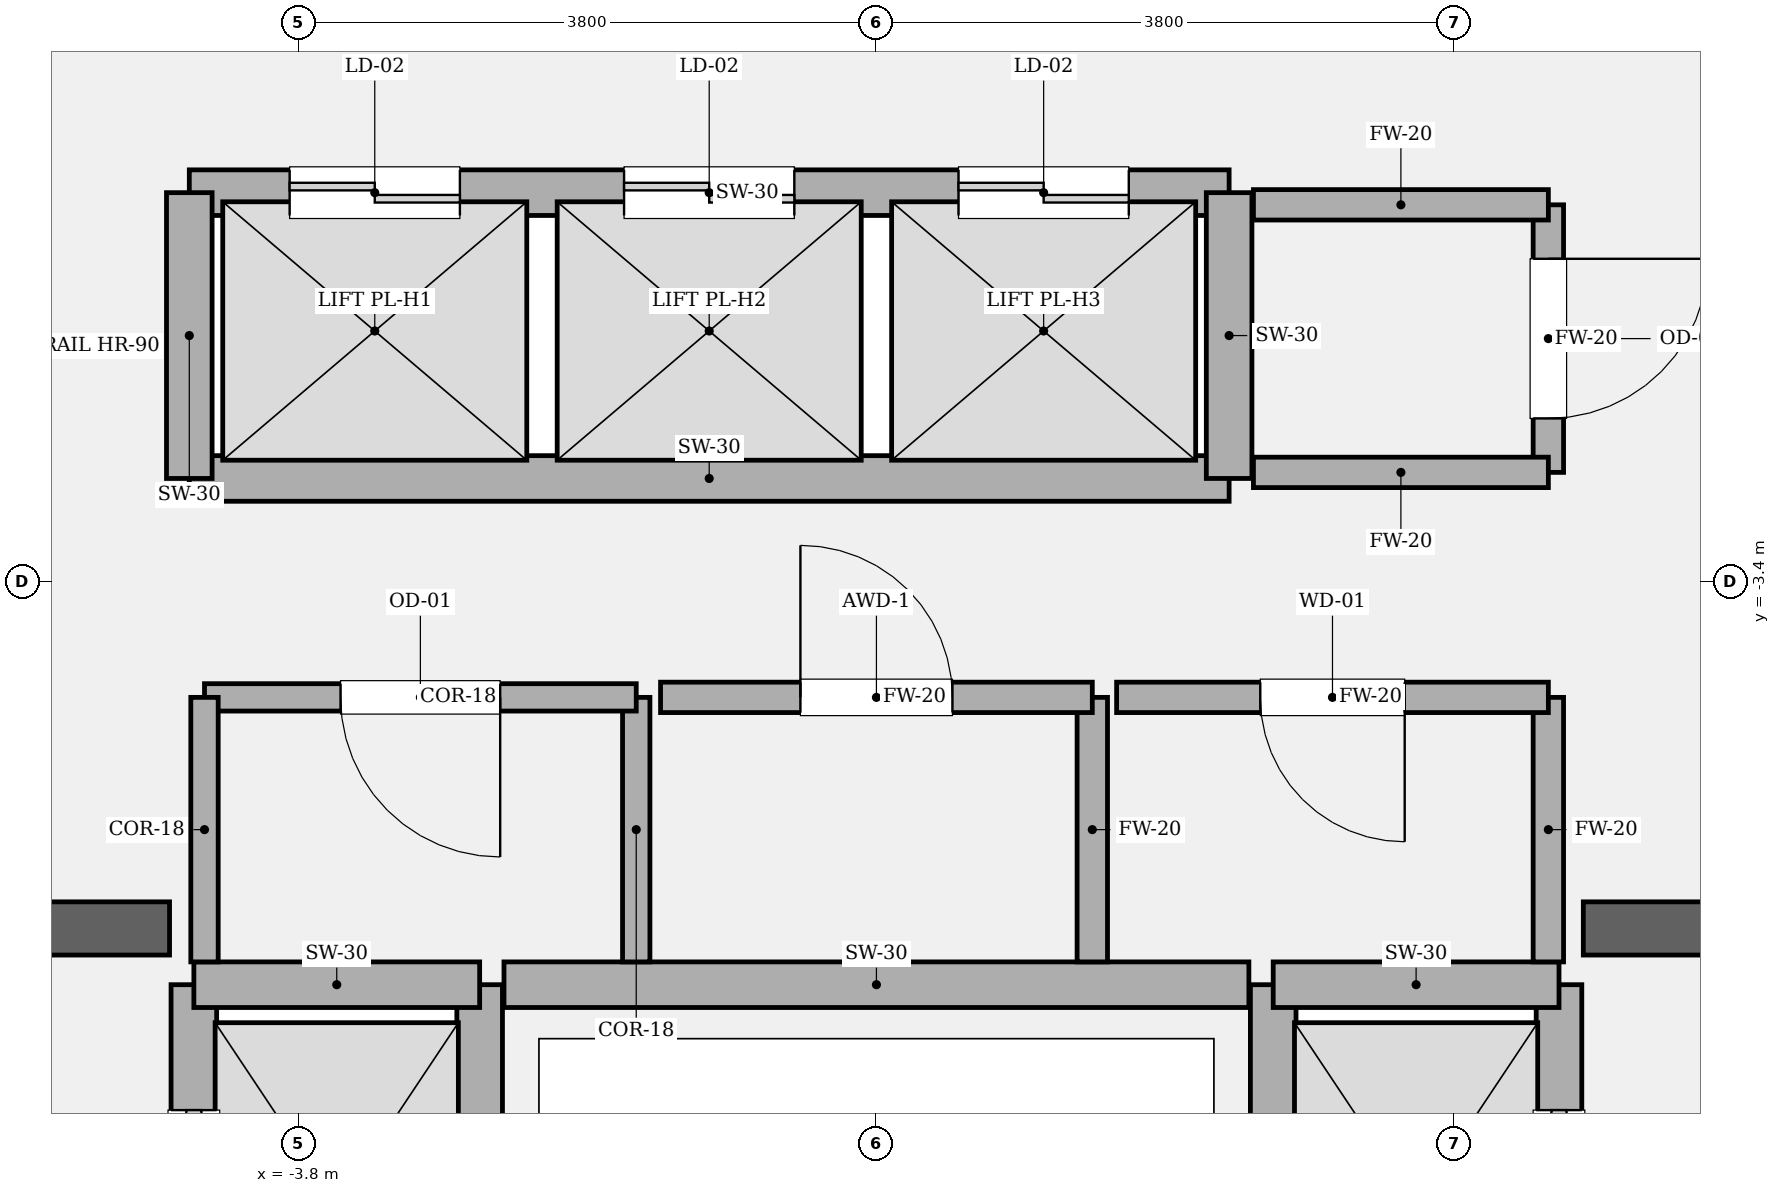
"""IFC4 building model, lengths in metres.
Left out: names, types, materials, properties, quantities, classifications, styles, units other than length and angle.
Written with IfcOpenShell. Run it as: python <this file> out.ifc"""

import sys

from ifc_helpers import new_model, si_unit, direction, frame, frame_2d, origin, place, context, subcontext, project, spatial, rectangle, extrude, element, fill, save


model = new_model("IFC4")
c1 = context("Model", 3, precision=1e-05, world=origin(), true_north=direction((0.0, 1.0)))
c2 = subcontext(c1, "Body", "Model", "MODEL_VIEW")
j1 = project(units=[si_unit("LENGTHUNIT", "METRE"), si_unit("PLANEANGLEUNIT", "RADIAN")], contexts=[c1])
p1 = place(None, origin())
s1 = spatial("IfcSite", under=j1, at=p1, CompositionType="ELEMENT")
p2 = place(p1, origin())
s2 = spatial("IfcBuilding", under=s1, at=p2, CompositionType="ELEMENT")
p3 = place(p2, frame((0.0, 0.0, 267.6)))
s3 = spatial("IfcBuildingStorey", under=s2, at=p3, CompositionType="ELEMENT", Elevation=267.6)
p4 = place(p3, frame((-9.925, -5.68, 0.0), z_axis=(0.0, 0.0, 1.0), x_axis=(1.0, 0.0, 0.0)))
e1 = element("IfcWall", 1, at=p4, inside=s3, PredefinedType="SOLIDWALL", context=c2, shape_type="SweptSolid", body=[
    extrude(rectangle(XDim=5.275, YDim=0.35, at=frame_2d((2.638, 0.0))), origin(), (0.0, 0.0, 1.0), 4.05),
])
p5 = place(p4, frame((1.385, 0.0, 0.0)))
e2 = element("IfcOpeningElement", 2, at=p5, cuts=e1, PredefinedType="OPENING", context=c2, shape_type="SweptSolid", body=[
    extrude(rectangle(XDim=1.18, YDim=2.2, at=frame_2d((0.59, 1.1))), frame((0.0, 0.185, 0.0), z_axis=(0.0, -1.0, 0.0), x_axis=(1.0, 0.0, 0.0)), (0.0, 0.0, 1.0), 0.37),
])
p6 = place(p3, frame((4.65, -5.68, 0.0), z_axis=(0.0, 0.0, 1.0), x_axis=(1.0, 0.0, 0.0)))
e3 = element("IfcWall", 3, at=p6, inside=s3, PredefinedType="SOLIDWALL", context=c2, shape_type="SweptSolid", body=[
    extrude(rectangle(XDim=5.275, YDim=0.35, at=frame_2d((2.638, 0.0))), origin(), (0.0, 0.0, 1.0), 4.05),
])
p7 = place(p6, frame((2.71, 0.0, 0.0)))
e4 = element("IfcOpeningElement", 4, at=p7, cuts=e3, PredefinedType="OPENING", context=c2, shape_type="SweptSolid", body=[
    extrude(rectangle(XDim=1.18, YDim=2.2, at=frame_2d((0.59, 1.1))), frame((0.0, 0.185, 0.0), z_axis=(0.0, -1.0, 0.0), x_axis=(1.0, 0.0, 0.0)), (0.0, 0.0, 1.0), 0.37),
])
p8 = place(p3, frame((-4.49, -8.82, 0.0), z_axis=(0.0, 0.0, 1.0), x_axis=(0.0, 1.0, 0.0)))
e5 = element("IfcWall", 5, at=p8, inside=s3, PredefinedType="SOLIDWALL", context=c2, shape_type="SweptSolid", body=[
    extrude(rectangle(XDim=2.77, YDim=0.3, at=frame_2d((1.385, 0.0))), origin(), (0.0, 0.0, 1.0), 3.85),
])
p9 = place(p8, frame((0.825, 0.0, 0.0)))
e6 = element("IfcOpeningElement", 6, at=p9, cuts=e5, PredefinedType="OPENING", context=c2, shape_type="SweptSolid", body=[
    extrude(rectangle(XDim=1.12, YDim=2.25, at=frame_2d((0.56, 1.125))), frame((0.0, 0.16, 0.0), z_axis=(0.0, -1.0, 0.0), x_axis=(1.0, 0.0, 0.0)), (0.0, 0.0, 1.0), 0.32),
])
p10 = place(p3, frame((-2.61, -8.82, 0.0), z_axis=(0.0, 0.0, 1.0), x_axis=(0.0, 1.0, 0.0)))
e7 = element("IfcWall", 7, at=p10, inside=s3, PredefinedType="SOLIDWALL", context=c2, shape_type="SweptSolid", body=[
    extrude(rectangle(XDim=2.77, YDim=0.3, at=frame_2d((1.385, 0.0))), origin(), (0.0, 0.0, 1.0), 3.85),
])
p11 = place(p3, frame((-4.49, -6.05, 0.0), z_axis=(0.0, 0.0, 1.0), x_axis=(1.0, 0.0, 0.0)))
e8 = element("IfcWall", 8, at=p11, inside=s3, PredefinedType="SOLIDWALL", context=c2, shape_type="SweptSolid", body=[
    extrude(rectangle(XDim=1.88, YDim=0.3, at=frame_2d((0.94, 0.0))), origin(), (0.0, 0.0, 1.0), 3.85),
])
p12 = place(p3, frame((4.49, -8.82, 0.0), z_axis=(0.0, 0.0, 1.0), x_axis=(0.0, 1.0, 0.0)))
e9 = element("IfcWall", 9, at=p12, inside=s3, PredefinedType="SOLIDWALL", context=c2, shape_type="SweptSolid", body=[
    extrude(rectangle(XDim=2.77, YDim=0.3, at=frame_2d((1.385, 0.0))), origin(), (0.0, 0.0, 1.0), 3.85),
])
p13 = place(p12, frame((0.825, 0.0, 0.0)))
e10 = element("IfcOpeningElement", 10, at=p13, cuts=e9, PredefinedType="OPENING", context=c2, shape_type="SweptSolid", body=[
    extrude(rectangle(XDim=1.12, YDim=2.25, at=frame_2d((0.56, 1.125))), frame((0.0, 0.16, 0.0), z_axis=(0.0, -1.0, 0.0), x_axis=(1.0, 0.0, 0.0)), (0.0, 0.0, 1.0), 0.32),
])
p14 = place(p3, frame((2.61, -8.82, 0.0), z_axis=(0.0, 0.0, 1.0), x_axis=(0.0, 1.0, 0.0)))
e11 = element("IfcWall", 11, at=p14, inside=s3, PredefinedType="SOLIDWALL", context=c2, shape_type="SweptSolid", body=[
    extrude(rectangle(XDim=2.77, YDim=0.3, at=frame_2d((1.385, 0.0))), origin(), (0.0, 0.0, 1.0), 3.85),
])
p15 = place(p3, frame((2.61, -6.05, 0.0), z_axis=(0.0, 0.0, 1.0), x_axis=(1.0, 0.0, 0.0)))
e12 = element("IfcWall", 12, at=p15, inside=s3, PredefinedType="SOLIDWALL", context=c2, shape_type="SweptSolid", body=[
    extrude(rectangle(XDim=1.88, YDim=0.3, at=frame_2d((0.94, 0.0))), origin(), (0.0, 0.0, 1.0), 3.85),
])
p16 = place(p3, frame((-4.52, -0.84, 0.0), z_axis=(0.0, 0.0, 1.0), x_axis=(1.0, 0.0, 0.0)))
e13 = element("IfcWall", 13, at=p16, inside=s3, PredefinedType="SOLIDWALL", context=c2, shape_type="SweptSolid", body=[
    extrude(rectangle(XDim=6.84, YDim=0.3, at=frame_2d((3.42, 0.0))), origin(), (0.0, 0.0, 1.0), 3.85),
])
p17 = place(p16, frame((0.66, 0.0, 0.0)))
e14 = element("IfcOpeningElement", 14, at=p17, cuts=e13, PredefinedType="OPENING", context=c2, shape_type="SweptSolid", body=[
    extrude(rectangle(XDim=1.12, YDim=2.25, at=frame_2d((0.56, 1.125))), frame((0.0, 0.16, 0.0), z_axis=(0.0, -1.0, 0.0), x_axis=(1.0, 0.0, 0.0)), (0.0, 0.0, 1.0), 0.32),
])
p18 = place(p16, frame((2.86, 0.0, 0.0)))
e15 = element("IfcOpeningElement", 15, at=p18, cuts=e13, PredefinedType="OPENING", context=c2, shape_type="SweptSolid", body=[
    extrude(rectangle(XDim=1.12, YDim=2.25, at=frame_2d((0.56, 1.125))), frame((0.0, 0.16, 0.0), z_axis=(0.0, -1.0, 0.0), x_axis=(1.0, 0.0, 0.0)), (0.0, 0.0, 1.0), 0.32),
])
p19 = place(p16, frame((5.06, 0.0, 0.0)))
e16 = element("IfcOpeningElement", 16, at=p19, cuts=e13, PredefinedType="OPENING", context=c2, shape_type="SweptSolid", body=[
    extrude(rectangle(XDim=1.12, YDim=2.25, at=frame_2d((0.56, 1.125))), frame((0.0, 0.16, 0.0), z_axis=(0.0, -1.0, 0.0), x_axis=(1.0, 0.0, 0.0)), (0.0, 0.0, 1.0), 0.32),
])
p20 = place(p3, frame((-4.52, -2.72, 0.0), z_axis=(0.0, 0.0, 1.0), x_axis=(1.0, 0.0, 0.0)))
e17 = element("IfcWall", 17, at=p20, inside=s3, PredefinedType="SOLIDWALL", context=c2, shape_type="SweptSolid", body=[
    extrude(rectangle(XDim=6.84, YDim=0.3, at=frame_2d((3.42, 0.0))), origin(), (0.0, 0.0, 1.0), 3.85),
])
for number, where, z_axis, x_axis in (
    (18, (-4.52, -2.72, 0.0), (0.0, 0.0, 1.0), (0.0, 1.0, 0.0)),
    (19, (2.32, -2.72, 0.0), (0.0, 0.0, 1.0), (0.0, 1.0, 0.0)),
):
    element("IfcWall", number, at=place(p3, frame(where, z_axis=z_axis, x_axis=x_axis)), inside=s3, PredefinedType="SOLIDWALL", context=c2, shape_type="SweptSolid", body=[
        extrude(rectangle(XDim=1.88, YDim=0.3, at=frame_2d((0.94, 0.0))), origin(), (0.0, 0.0, 1.0), 3.85),
    ])
p21 = place(p3, frame((-2.45, -6.05, 0.0), z_axis=(0.0, 0.0, 1.0), x_axis=(1.0, 0.0, 0.0)))
e20 = element("IfcWall", 20, at=p21, inside=s3, PredefinedType="SOLIDWALL", context=c2, shape_type="SweptSolid", body=[
    extrude(rectangle(XDim=4.9, YDim=0.3, at=frame_2d((2.45, 0.0))), origin(), (0.0, 0.0, 1.0), 3.85),
])
p22 = place(p3, frame((-1.58, -5.9, 0.0), z_axis=(0.0, 0.0, 1.0), x_axis=(0.0, 1.0, 0.0)))
e21 = element("IfcWall", 21, at=p22, inside=s3, PredefinedType="PARTITIONING", context=c2, shape_type="SweptSolid", body=[
    extrude(rectangle(XDim=1.74, YDim=0.18, at=frame_2d((0.87, 0.0))), origin(), (0.0, 0.0, 1.0), 3.85),
])
p23 = place(p3, frame((-1.58, -4.16, 0.0), z_axis=(0.0, 0.0, 1.0), x_axis=(-1.0, 0.0, 0.0)))
e22 = element("IfcWall", 22, at=p23, inside=s3, PredefinedType="PARTITIONING", context=c2, shape_type="SweptSolid", body=[
    extrude(rectangle(XDim=2.84, YDim=0.18, at=frame_2d((1.42, 0.0))), origin(), (0.0, 0.0, 1.0), 3.85),
])
p24 = place(p23, frame((0.895, 0.0, 0.0)))
e23 = element("IfcOpeningElement", 23, at=p24, cuts=e22, PredefinedType="OPENING", context=c2, shape_type="SweptSolid", body=[
    extrude(rectangle(XDim=1.05, YDim=2.2, at=frame_2d((0.525, 1.1))), frame((0.0, 0.1, 0.0), z_axis=(0.0, -1.0, 0.0), x_axis=(1.0, 0.0, 0.0)), (0.0, 0.0, 1.0), 0.2),
])
p25 = place(p3, frame((-4.42, -4.16, 0.0), z_axis=(0.0, 0.0, 1.0), x_axis=(0.0, -1.0, 0.0)))
e24 = element("IfcWall", 24, at=p25, inside=s3, PredefinedType="PARTITIONING", context=c2, shape_type="SweptSolid", body=[
    extrude(rectangle(XDim=1.74, YDim=0.18, at=frame_2d((0.87, 0.0))), origin(), (0.0, 0.0, 1.0), 3.85),
])
p26 = place(p3, frame((1.42, -5.9, 0.0), z_axis=(0.0, 0.0, 1.0), x_axis=(0.0, 1.0, 0.0)))
e25 = element("IfcWall", 25, at=p26, inside=s3, PredefinedType="SOLIDWALL", context=c2, shape_type="SweptSolid", body=[
    extrude(rectangle(XDim=1.74, YDim=0.2, at=frame_2d((0.87, 0.0))), origin(), (0.0, 0.0, 1.0), 3.85),
])
p27 = place(p3, frame((1.42, -4.16, 0.0), z_axis=(0.0, 0.0, 1.0), x_axis=(-1.0, 0.0, 0.0)))
e26 = element("IfcWall", 26, at=p27, inside=s3, PredefinedType="SOLIDWALL", context=c2, shape_type="SweptSolid", body=[
    extrude(rectangle(XDim=2.84, YDim=0.2, at=frame_2d((1.42, 0.0))), origin(), (0.0, 0.0, 1.0), 3.85),
])
p28 = place(p27, frame((0.92, 0.0, 0.0)))
e27 = element("IfcOpeningElement", 27, at=p28, cuts=e26, PredefinedType="OPENING", context=c2, shape_type="SweptSolid", body=[
    extrude(rectangle(XDim=1.0, YDim=2.15, at=frame_2d((0.5, 1.075))), frame((0.0, 0.11, 0.0), z_axis=(0.0, -1.0, 0.0), x_axis=(1.0, 0.0, 0.0)), (0.0, 0.0, 1.0), 0.22),
])
p29 = place(p3, frame((4.42, -5.9, 0.0), z_axis=(0.0, 0.0, 1.0), x_axis=(0.0, 1.0, 0.0)))
e28 = element("IfcWall", 28, at=p29, inside=s3, PredefinedType="SOLIDWALL", context=c2, shape_type="SweptSolid", body=[
    extrude(rectangle(XDim=1.74, YDim=0.2, at=frame_2d((0.87, 0.0))), origin(), (0.0, 0.0, 1.0), 3.85),
])
p30 = place(p3, frame((4.42, -4.16, 0.0), z_axis=(0.0, 0.0, 1.0), x_axis=(-1.0, 0.0, 0.0)))
e29 = element("IfcWall", 29, at=p30, inside=s3, PredefinedType="SOLIDWALL", context=c2, shape_type="SweptSolid", body=[
    extrude(rectangle(XDim=2.84, YDim=0.2, at=frame_2d((1.42, 0.0))), origin(), (0.0, 0.0, 1.0), 3.85),
])
p31 = place(p30, frame((0.945, 0.0, 0.0)))
e30 = element("IfcOpeningElement", 30, at=p31, cuts=e29, PredefinedType="OPENING", context=c2, shape_type="SweptSolid", body=[
    extrude(rectangle(XDim=0.95, YDim=2.15, at=frame_2d((0.475, 1.075))), frame((0.0, 0.11, 0.0), z_axis=(0.0, -1.0, 0.0), x_axis=(1.0, 0.0, 0.0)), (0.0, 0.0, 1.0), 0.22),
])
p32 = place(p3, frame((4.42, -2.68, 0.0), z_axis=(0.0, 0.0, 1.0), x_axis=(0.0, 1.0, 0.0)))
e31 = element("IfcWall", 31, at=p32, inside=s3, PredefinedType="SOLIDWALL", context=c2, shape_type="SweptSolid", body=[
    extrude(rectangle(XDim=1.76, YDim=0.2, at=frame_2d((0.88, 0.0))), origin(), (0.0, 0.0, 1.0), 3.85),
])
p33 = place(p32, frame((0.355, 0.0, 0.0)))
e32 = element("IfcOpeningElement", 32, at=p33, cuts=e31, PredefinedType="OPENING", context=c2, shape_type="SweptSolid", body=[
    extrude(rectangle(XDim=1.05, YDim=2.2, at=frame_2d((0.525, 1.1))), frame((0.0, 0.11, 0.0), z_axis=(0.0, -1.0, 0.0), x_axis=(1.0, 0.0, 0.0)), (0.0, 0.0, 1.0), 0.22),
])
for number, where, z_axis, x_axis in (
    (33, (4.42, -0.92, 0.0), (0.0, 0.0, 1.0), (-1.0, 0.0, 0.0)),
    (34, (2.48, -2.68, 0.0), (0.0, 0.0, 1.0), (1.0, 0.0, 0.0)),
):
    element("IfcWall", number, at=place(p3, frame(where, z_axis=z_axis, x_axis=x_axis)), inside=s3, PredefinedType="SOLIDWALL", context=c2, shape_type="SweptSolid", body=[
        extrude(rectangle(XDim=1.94, YDim=0.2, at=frame_2d((0.97, 0.0))), origin(), (0.0, 0.0, 1.0), 3.85),
    ])
p34 = place(p9, origin())
e35 = element("IfcDoor", 35, at=p34, inside=s3, OperationType="SLIDING_TO_LEFT", PredefinedType="DOOR", context=c2, shape_type="SweptSolid", body=[
    extrude(rectangle(XDim=1.12, YDim=2.25, at=frame_2d((0.56, 1.125))), frame((0.0, 0.025, 0.0), z_axis=(0.0, -1.0, 0.0), x_axis=(1.0, 0.0, 0.0)), (0.0, 0.0, 1.0), 0.05),
])
fill(e6, e35)
p35 = place(p13, origin())
e36 = element("IfcDoor", 36, at=p35, inside=s3, OperationType="SLIDING_TO_RIGHT", PredefinedType="DOOR", context=c2, shape_type="SweptSolid", body=[
    extrude(rectangle(XDim=1.12, YDim=2.25, at=frame_2d((0.56, 1.125))), frame((0.0, 0.025, 0.0), z_axis=(0.0, -1.0, 0.0), x_axis=(1.0, 0.0, 0.0)), (0.0, 0.0, 1.0), 0.05),
])
fill(e10, e36)
p36 = place(p17, origin())
e37 = element("IfcDoor", 37, at=p36, inside=s3, OperationType="DOUBLE_DOOR_SLIDING", PredefinedType="DOOR", context=c2, shape_type="SweptSolid", body=[
    extrude(rectangle(XDim=1.12, YDim=2.25, at=frame_2d((0.56, 1.125))), frame((0.0, 0.025, 0.0), z_axis=(0.0, -1.0, 0.0), x_axis=(1.0, 0.0, 0.0)), (0.0, 0.0, 1.0), 0.05),
])
fill(e14, e37)
p37 = place(p18, origin())
e38 = element("IfcDoor", 38, at=p37, inside=s3, OperationType="DOUBLE_DOOR_SLIDING", PredefinedType="DOOR", context=c2, shape_type="SweptSolid", body=[
    extrude(rectangle(XDim=1.12, YDim=2.25, at=frame_2d((0.56, 1.125))), frame((0.0, 0.025, 0.0), z_axis=(0.0, -1.0, 0.0), x_axis=(1.0, 0.0, 0.0)), (0.0, 0.0, 1.0), 0.05),
])
fill(e15, e38)
p38 = place(p19, origin())
e39 = element("IfcDoor", 39, at=p38, inside=s3, OperationType="DOUBLE_DOOR_SLIDING", PredefinedType="DOOR", context=c2, shape_type="SweptSolid", body=[
    extrude(rectangle(XDim=1.12, YDim=2.25, at=frame_2d((0.56, 1.125))), frame((0.0, 0.025, 0.0), z_axis=(0.0, -1.0, 0.0), x_axis=(1.0, 0.0, 0.0)), (0.0, 0.0, 1.0), 0.05),
])
fill(e16, e39)
p39 = place(p24, origin())
e40 = element("IfcDoor", 40, at=p39, inside=s3, OperationType="SINGLE_SWING_LEFT", PredefinedType="DOOR", context=c2, shape_type="SweptSolid", body=[
    extrude(rectangle(XDim=1.05, YDim=2.2, at=frame_2d((0.525, 1.1))), frame((0.0, 0.025, 0.0), z_axis=(0.0, -1.0, 0.0), x_axis=(1.0, 0.0, 0.0)), (0.0, 0.0, 1.0), 0.05),
])
fill(e23, e40)
p40 = place(p28, origin())
e41 = element("IfcDoor", 41, at=p40, inside=s3, OperationType="SINGLE_SWING_RIGHT", PredefinedType="DOOR", context=c2, shape_type="SweptSolid", body=[
    extrude(rectangle(XDim=1.0, YDim=2.15, at=frame_2d((0.5, 1.075))), frame((0.0, 0.025, 0.0), z_axis=(0.0, -1.0, 0.0), x_axis=(1.0, 0.0, 0.0)), (0.0, 0.0, 1.0), 0.05),
])
fill(e27, e41)
p41 = place(p31, origin())
e42 = element("IfcDoor", 42, at=p41, inside=s3, OperationType="SINGLE_SWING_LEFT", PredefinedType="DOOR", context=c2, shape_type="SweptSolid", body=[
    extrude(rectangle(XDim=0.95, YDim=2.15, at=frame_2d((0.475, 1.075))), frame((0.0, 0.025, 0.0), z_axis=(0.0, -1.0, 0.0), x_axis=(1.0, 0.0, 0.0)), (0.0, 0.0, 1.0), 0.05),
])
fill(e30, e42)
p42 = place(p33, origin())
e43 = element("IfcDoor", 43, at=p42, inside=s3, OperationType="SINGLE_SWING_RIGHT", PredefinedType="DOOR", context=c2, shape_type="SweptSolid", body=[
    extrude(rectangle(XDim=1.05, YDim=2.2, at=frame_2d((0.525, 1.1))), frame((0.0, 0.025, 0.0), z_axis=(0.0, -1.0, 0.0), x_axis=(1.0, 0.0, 0.0)), (0.0, 0.0, 1.0), 0.05),
])
fill(e32, e43)
save(model, sys.argv[1])
